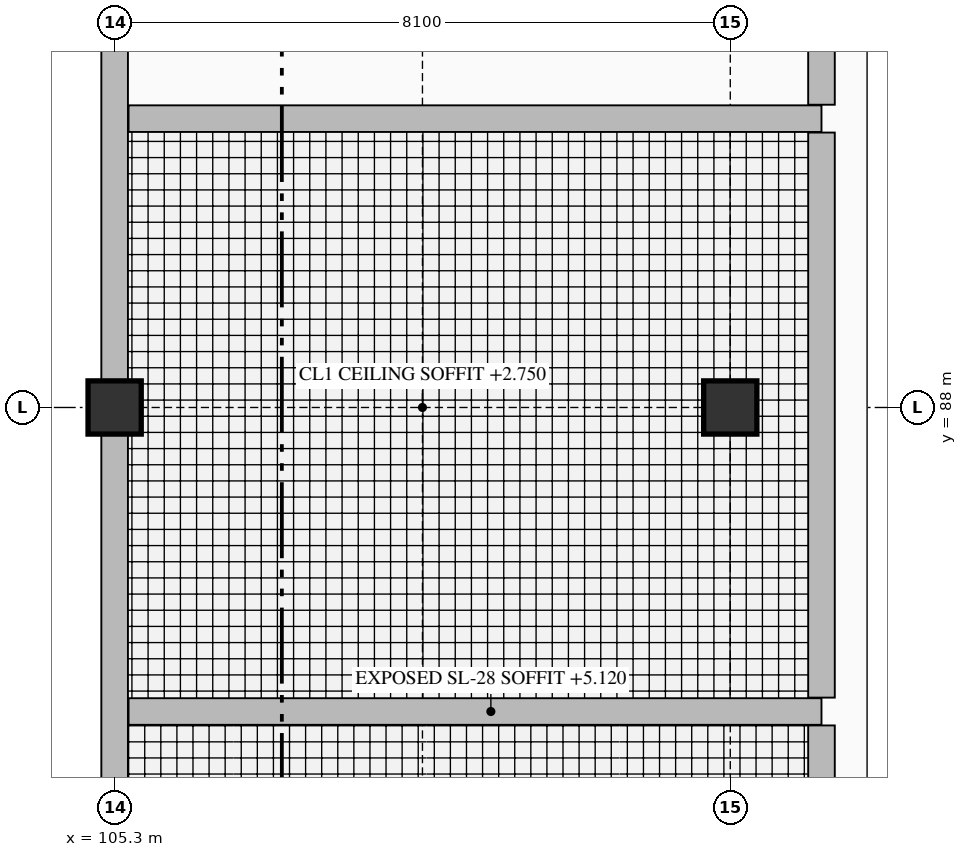
"""IFC4 building model, lengths in metres.
Left out: names, types, materials, properties, quantities, classifications, styles, units other than length and angle.
Written with IfcOpenShell. Run it as: python <this file> out.ifc"""

import sys

from ifc_helpers import new_model, si_unit, direction, frame, frame_2d, origin, origin_2d, place, context, subcontext, project, spatial, rectangle, extrude, element, fill, save


model = new_model("IFC4")
c1 = context("Model", 3, precision=1e-05, world=origin(), true_north=direction((0.0, 1.0)))
c2 = subcontext(c1, "Body", "Model", "MODEL_VIEW")
j1 = project(units=[si_unit("LENGTHUNIT", "METRE"), si_unit("PLANEANGLEUNIT", "RADIAN")], contexts=[c1])
p1 = place(None, origin())
s1 = spatial("IfcSite", under=j1, at=p1, CompositionType="ELEMENT")
p2 = place(p1, origin())
s2 = spatial("IfcBuilding", under=s1, at=p2, CompositionType="ELEMENT")
p3 = place(p2, origin())
s3 = spatial("IfcBuildingStorey", under=s2, at=p3, CompositionType="ELEMENT", Elevation=0.0)
for number, where, z_axis, x_axis in (
    (1, (105.3, 88.0, 0.0), (0.0, 0.0, 1.0), (1.0, 0.0, 0.0)),
    (2, (113.4, 88.0, 0.0), (0.0, 0.0, 1.0), (1.0, 0.0, 0.0)),
):
    element("IfcColumn", number, at=place(p3, frame(where, z_axis=z_axis, x_axis=x_axis)), inside=s3, PredefinedType="COLUMN", context=c2, shape_type="SweptSolid", body=[
        extrude(rectangle(XDim=0.7, YDim=0.7, at=origin_2d()), origin(), (0.0, 0.0, 1.0), 5.4),
    ])
p4 = place(p3, frame((105.3, 95.82, 0.0), z_axis=(0.0, 0.0, 1.0), x_axis=(0.0, -1.0, 0.0)))
e3 = element("IfcWall", 3, at=p4, inside=s3, PredefinedType="SOLIDWALL", context=c2, shape_type="SweptSolid", body=[
    extrude(rectangle(XDim=13.273, YDim=0.35, at=frame_2d((6.637, 0.0))), origin(), (0.0, 0.0, 1.0), 4.512),
])
for number, where, z_axis, x_axis in (
    (4, (105.483, 84.0, 0.0), (0.0, 0.0, 1.0), (1.0, 0.0, 0.0)),
    (5, (105.483, 91.8, 0.0), (0.0, 0.0, 1.0), (1.0, 0.0, 0.0)),
):
    element("IfcWall", number, at=place(p3, frame(where, z_axis=z_axis, x_axis=x_axis)), inside=s3, PredefinedType="SOLIDWALL", context=c2, shape_type="SweptSolid", body=[
        extrude(rectangle(XDim=9.117, YDim=0.35, at=frame_2d((4.559, 0.0))), origin(), (0.0, 0.0, 1.0), 5.12),
    ])
p5 = place(p3, frame((114.6, 76.683, 0.0), z_axis=(0.0, 0.0, 1.0), x_axis=(0.0, 1.0, 0.0)))
e6 = element("IfcWall", 6, at=p5, inside=s3, PredefinedType="SOLIDWALL", context=c2, shape_type="SweptSolid", body=[
    extrude(rectangle(XDim=7.134, YDim=0.35, at=frame_2d((3.567, 0.0))), origin(), (0.0, 0.0, 1.0), 5.12),
])
p6 = place(p5, frame((4.779, 0.0, 0.0)))
e7 = element("IfcOpeningElement", 7, at=p6, cuts=e6, PredefinedType="OPENING", context=c2, shape_type="SweptSolid", body=[
    extrude(rectangle(XDim=1.0, YDim=2.1, at=frame_2d((0.5, 1.05))), frame((0.0, 0.185, 0.0), z_axis=(0.0, -1.0, 0.0), x_axis=(1.0, 0.0, 0.0)), (0.0, 0.0, 1.0), 0.37),
])
p7 = place(p3, frame((114.6, 84.183, 0.0), z_axis=(0.0, 0.0, 1.0), x_axis=(0.0, 1.0, 0.0)))
e8 = element("IfcWall", 8, at=p7, inside=s3, PredefinedType="SOLIDWALL", context=c2, shape_type="SweptSolid", body=[
    extrude(rectangle(XDim=7.434, YDim=0.35, at=frame_2d((3.717, 0.0))), origin(), (0.0, 0.0, 1.0), 5.12),
])
p8 = place(p7, frame((0.738, 0.0, 0.0)))
e9 = element("IfcOpeningElement", 9, at=p8, cuts=e8, PredefinedType="OPENING", context=c2, shape_type="SweptSolid", body=[
    extrude(rectangle(XDim=1.2, YDim=2.35, at=frame_2d((0.6, 1.175))), frame((0.0, 0.185, 0.0), z_axis=(0.0, -1.0, 0.0), x_axis=(1.0, 0.0, 0.0)), (0.0, 0.0, 1.0), 0.37),
])
p9 = place(p3, frame((114.6, 91.983, 0.0), z_axis=(0.0, 0.0, 1.0), x_axis=(0.0, 1.0, 0.0)))
e10 = element("IfcWall", 10, at=p9, inside=s3, PredefinedType="SOLIDWALL", context=c2, shape_type="SweptSolid", body=[
    extrude(rectangle(XDim=3.834, YDim=0.35, at=frame_2d((1.917, 0.0))), origin(), (0.0, 0.0, 1.0), 5.12),
])
p10 = place(p9, frame((1.367, 0.0, 0.0)))
e11 = element("IfcOpeningElement", 11, at=p10, cuts=e10, PredefinedType="OPENING", context=c2, shape_type="SweptSolid", body=[
    extrude(rectangle(XDim=1.1, YDim=2.25, at=frame_2d((0.55, 1.125))), frame((0.0, 0.185, 0.0), z_axis=(0.0, -1.0, 0.0), x_axis=(1.0, 0.0, 0.0)), (0.0, 0.0, 1.0), 0.37),
])
p11 = place(p8, origin())
e12 = element("IfcDoor", 12, at=p11, inside=s3, OperationType="SINGLE_SWING_RIGHT", PredefinedType="DOOR", context=c2, shape_type="SweptSolid", body=[
    extrude(rectangle(XDim=1.2, YDim=2.35, at=frame_2d((0.6, 1.175))), frame((0.0, 0.025, 0.0), z_axis=(0.0, -1.0, 0.0), x_axis=(1.0, 0.0, 0.0)), (0.0, 0.0, 1.0), 0.05),
])
fill(e9, e12)
save(model, sys.argv[1])
